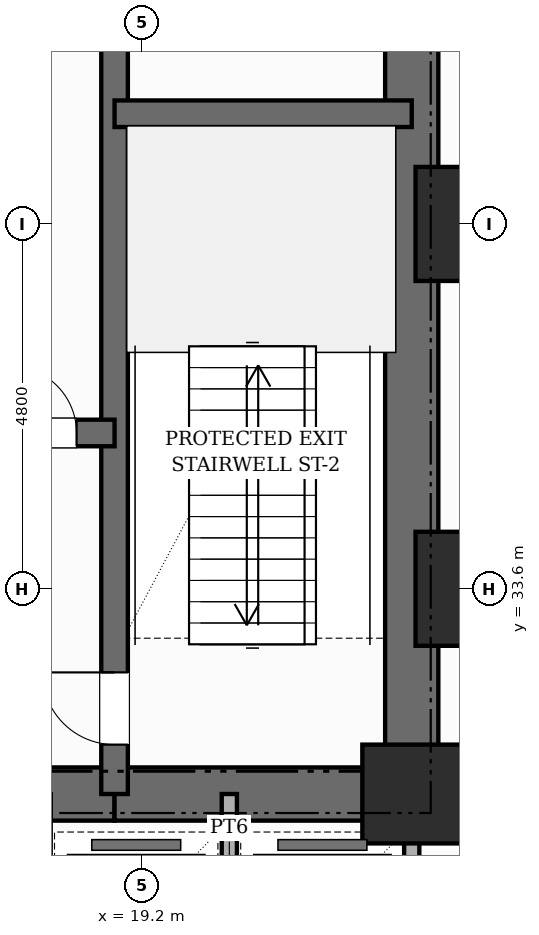
"""IFC4 building model, lengths in metres.
Left out: names, types, materials, properties, quantities, classifications, styles, units other than length and angle.
Written with IfcOpenShell. Run it as: python <this file> out.ifc"""

import sys

from ifc_helpers import new_model, si_unit, direction, frame, frame_2d, origin, origin_2d, place, context, subcontext, project, spatial, rectangle, extrude, element, fill, save


model = new_model("IFC4")
c1 = context("Model", 3, precision=1e-05, world=origin(), true_north=direction((0.0, 1.0)))
c2 = subcontext(c1, "Body", "Model", "MODEL_VIEW")
j1 = project(units=[si_unit("LENGTHUNIT", "METRE"), si_unit("PLANEANGLEUNIT", "RADIAN")], contexts=[c1])
p1 = place(None, origin())
s1 = spatial("IfcSite", under=j1, at=p1, CompositionType="ELEMENT")
p2 = place(p1, origin())
s2 = spatial("IfcBuilding", under=s1, at=p2, CompositionType="ELEMENT")
p3 = place(p2, origin())
s3 = spatial("IfcBuildingStorey", under=s2, at=p3, CompositionType="ELEMENT", Elevation=0.0)
p4 = place(p3, frame((22.75, 30.55, 0.0), z_axis=(0.0, 0.0, 1.0), x_axis=(0.0, 1.0, 0.0)))
e1 = element("IfcWall", 1, at=p4, inside=s3, PredefinedType="SHEAR", context=c2, shape_type="SweptSolid", body=[
    extrude(rectangle(XDim=15.6, YDim=0.7, at=frame_2d((7.8, 0.0))), origin(), (0.0, 0.0, 1.0), 5.2),
])
p5 = place(p4, frame((10.8, 0.0, 0.0)))
e2 = element("IfcOpeningElement", 2, at=p5, cuts=e1, PredefinedType="OPENING", context=c2, shape_type="SweptSolid", body=[
    extrude(rectangle(XDim=1.0, YDim=2.15, at=frame_2d((0.5, 1.075))), frame((0.0, 0.36, 0.0), z_axis=(0.0, -1.0, 0.0), x_axis=(1.0, 0.0, 0.0)), (0.0, 0.0, 1.0), 0.72),
])
p6 = place(p3, frame((9.96, 30.9, 0.0), z_axis=(0.0, 0.0, 1.0), x_axis=(1.0, 0.0, 0.0)))
e3 = element("IfcWall", 3, at=p6, inside=s3, PredefinedType="SHEAR", context=c2, shape_type="SweptSolid", body=[
    extrude(rectangle(XDim=8.88, YDim=0.7, at=frame_2d((4.44, 0.0))), origin(), (0.0, 0.0, 1.0), 5.2),
])
p7 = place(p6, frame((4.09, 0.0, 0.0)))
e4 = element("IfcOpeningElement", 4, at=p7, cuts=e3, PredefinedType="OPENING", context=c2, shape_type="SweptSolid", body=[
    extrude(rectangle(XDim=1.0, YDim=2.15, at=frame_2d((0.5, 1.075))), frame((0.0, 0.36, 0.0), z_axis=(0.0, -1.0, 0.0), x_axis=(1.0, 0.0, 0.0)), (0.0, 0.0, 1.0), 0.72),
])
p8 = place(p3, frame((18.84, 30.9, 0.0), z_axis=(0.0, 0.0, 1.0), x_axis=(1.0, 0.0, 0.0)))
e5 = element("IfcWall", 5, at=p8, inside=s3, PredefinedType="SHEAR", context=c2, shape_type="SweptSolid", body=[
    extrude(rectangle(XDim=3.91, YDim=0.7, at=frame_2d((1.955, 0.0))), origin(), (0.0, 0.0, 1.0), 5.2),
])
p9 = place(p3, frame((18.84, 30.9, 0.0), z_axis=(0.0, 0.0, 1.0), x_axis=(0.0, 1.0, 0.0)))
e6 = element("IfcWall", 6, at=p9, inside=s3, PredefinedType="SHEAR", context=c2, shape_type="SweptSolid", body=[
    extrude(rectangle(XDim=14.9, YDim=0.35, at=frame_2d((7.45, 0.0))), origin(), (0.0, 0.0, 1.0), 5.2),
])
p10 = place(p9, frame((0.65, 0.0, 0.0)))
e7 = element("IfcOpeningElement", 7, at=p10, cuts=e6, PredefinedType="OPENING", context=c2, shape_type="SweptSolid", body=[
    extrude(rectangle(XDim=0.95, YDim=2.1, at=frame_2d((0.475, 1.05))), frame((0.0, 0.185, 0.0), z_axis=(0.0, -1.0, 0.0), x_axis=(1.0, 0.0, 0.0)), (0.0, 0.0, 1.0), 0.37),
])
p11 = place(p9, frame((10.45, 0.0, 0.0)))
e8 = element("IfcOpeningElement", 8, at=p11, cuts=e6, PredefinedType="OPENING", context=c2, shape_type="SweptSolid", body=[
    extrude(rectangle(XDim=1.0, YDim=2.15, at=frame_2d((0.5, 1.075))), frame((0.0, 0.185, 0.0), z_axis=(0.0, -1.0, 0.0), x_axis=(1.0, 0.0, 0.0)), (0.0, 0.0, 1.0), 0.37),
])
p12 = place(p3, frame((18.84, 39.85, 0.0), z_axis=(0.0, 0.0, 1.0), x_axis=(1.0, 0.0, 0.0)))
e9 = element("IfcWall", 9, at=p12, inside=s3, PredefinedType="SHEAR", context=c2, shape_type="SweptSolid", body=[
    extrude(rectangle(XDim=3.91, YDim=0.35, at=frame_2d((1.955, 0.0))), origin(), (0.0, 0.0, 1.0), 5.2),
])
p13 = place(p3, frame((9.96, 35.65, 0.0), z_axis=(0.0, 0.0, 1.0), x_axis=(1.0, 0.0, 0.0)))
e10 = element("IfcWall", 10, at=p13, inside=s3, PredefinedType="SHEAR", context=c2, shape_type="SweptSolid", body=[
    extrude(rectangle(XDim=8.88, YDim=0.35, at=frame_2d((4.44, 0.0))), origin(), (0.0, 0.0, 1.0), 5.2),
])
p14 = place(p13, frame((0.84, 0.0, 0.0)))
e11 = element("IfcOpeningElement", 11, at=p14, cuts=e10, PredefinedType="OPENING", context=c2, shape_type="SweptSolid", body=[
    extrude(rectangle(XDim=1.1, YDim=2.15, at=frame_2d((0.55, 1.075))), frame((0.0, 0.185, 0.0), z_axis=(0.0, -1.0, 0.0), x_axis=(1.0, 0.0, 0.0)), (0.0, 0.0, 1.0), 0.37),
])
p15 = place(p13, frame((5.24, 0.0, 0.0)))
e12 = element("IfcOpeningElement", 12, at=p15, cuts=e10, PredefinedType="OPENING", context=c2, shape_type="SweptSolid", body=[
    extrude(rectangle(XDim=1.1, YDim=2.15, at=frame_2d((0.55, 1.075))), frame((0.0, 0.185, 0.0), z_axis=(0.0, -1.0, 0.0), x_axis=(1.0, 0.0, 0.0)), (0.0, 0.0, 1.0), 0.37),
])
p16 = place(p13, frame((7.5, 0.0, 0.0)))
e13 = element("IfcOpeningElement", 13, at=p16, cuts=e10, PredefinedType="OPENING", context=c2, shape_type="SweptSolid", body=[
    extrude(rectangle(XDim=0.88, YDim=2.1, at=frame_2d((0.44, 1.05))), frame((0.0, 0.185, 0.0), z_axis=(0.0, -1.0, 0.0), x_axis=(1.0, 0.0, 0.0)), (0.0, 0.0, 1.0), 0.37),
])
p17 = place(p3, frame((22.75, 30.9, 0.0), z_axis=(0.0, 0.0, 1.0), x_axis=(1.0, 0.0, 0.0)))
e14 = element("IfcColumn", 14, at=p17, inside=s3, PredefinedType="COLUMN", context=c2, shape_type="SweptSolid", body=[
    extrude(rectangle(XDim=1.3, YDim=1.3, at=origin_2d()), origin(), (0.0, 0.0, 1.0), 5.2),
])
for number, where, z_axis, x_axis in (
    (15, (23.55, 33.6, 0.0), (0.0, 0.0, 1.0), (1.0, 0.0, 0.0)),
    (16, (23.55, 38.4, 0.0), (0.0, 0.0, 1.0), (1.0, 0.0, 0.0)),
):
    element("IfcColumn", number, at=place(p3, frame(where, z_axis=z_axis, x_axis=x_axis)), inside=s3, PredefinedType="USERDEFINED", context=c2, shape_type="SweptSolid", body=[
        extrude(rectangle(XDim=1.5, YDim=1.5, at=origin_2d()), origin(), (0.0, 0.0, 1.0), 5.2),
    ])
p18 = place(p3, frame((22.75, 27.9, 0.0), z_axis=(0.0, 0.0, 1.0), x_axis=(0.0, 1.0, 0.0)))
e17 = element("IfcWall", 17, at=p18, inside=s3, PredefinedType="POLYGONAL", context=c2, shape_type="SweptSolid", body=[
    extrude(rectangle(XDim=3.0, YDim=0.2, at=frame_2d((1.5, 0.0))), origin(), (0.0, 0.0, 1.0), 4.89),
])
p19 = place(p3, frame((20.35, 28.0, 0.0), z_axis=(0.0, 0.0, 1.0), x_axis=(0.0, 1.0, 0.0)))
e18 = element("IfcWall", 18, at=p19, inside=s3, PredefinedType="POLYGONAL", context=c2, shape_type="SweptSolid", body=[
    extrude(rectangle(XDim=2.9, YDim=0.2, at=frame_2d((1.45, 0.0))), origin(), (0.0, 0.0, 1.0), 4.89),
])
p20 = place(p10, origin())
e19 = element("IfcDoor", 19, at=p20, inside=s3, OperationType="SINGLE_SWING_RIGHT", PredefinedType="DOOR", context=c2, shape_type="SweptSolid", body=[
    extrude(rectangle(XDim=0.95, YDim=2.1, at=frame_2d((0.475, 1.05))), frame((0.0, 0.025, 0.0), z_axis=(0.0, -1.0, 0.0), x_axis=(1.0, 0.0, 0.0)), (0.0, 0.0, 1.0), 0.05),
])
fill(e7, e19)
p21 = place(p16, origin())
e20 = element("IfcDoor", 20, at=p21, inside=s3, OperationType="SINGLE_SWING_LEFT", PredefinedType="DOOR", context=c2, shape_type="SweptSolid", body=[
    extrude(rectangle(XDim=0.88, YDim=2.1, at=frame_2d((0.44, 1.05))), frame((0.0, 0.025, 0.0), z_axis=(0.0, -1.0, 0.0), x_axis=(1.0, 0.0, 0.0)), (0.0, 0.0, 1.0), 0.05),
])
fill(e13, e20)
save(model, sys.argv[1])
